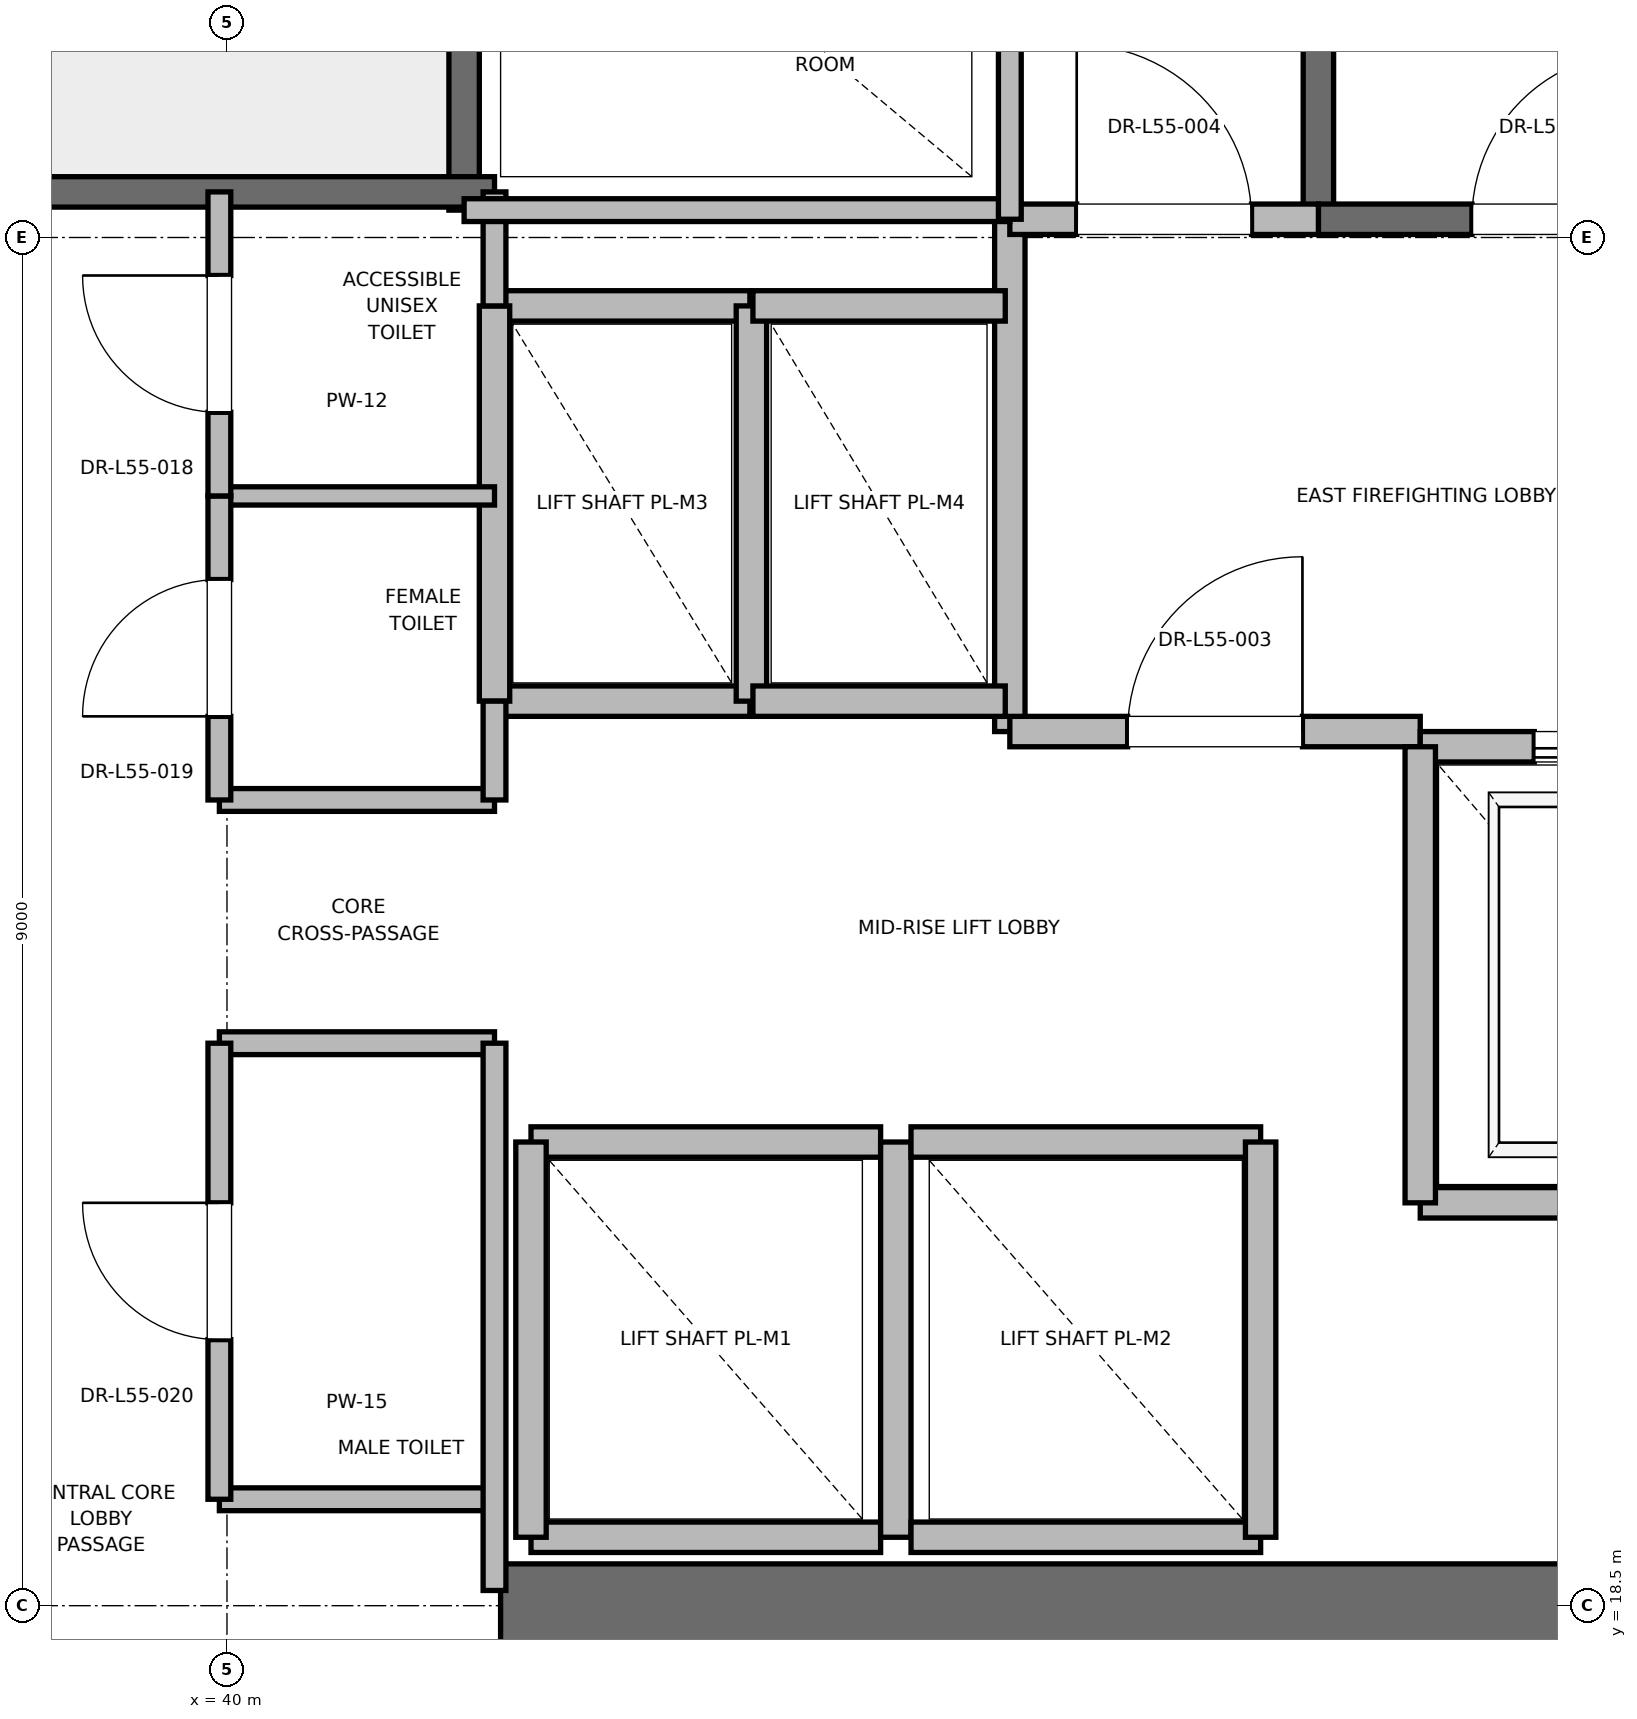
"""IFC4 building model, lengths in metres.
Left out: names, types, materials, properties, quantities, classifications, styles, units other than length and angle.
Written with IfcOpenShell. Run it as: python <this file> out.ifc"""

import sys

from ifc_helpers import new_model, si_unit, direction, frame, frame_2d, origin, place, context, subcontext, project, spatial, rectangle, extrude, element, fill, save


model = new_model("IFC4")
c1 = context("Model", 3, precision=1e-05, world=origin(), true_north=direction((0.0, 1.0)))
c2 = subcontext(c1, "Body", "Model", "MODEL_VIEW")
j1 = project(units=[si_unit("LENGTHUNIT", "METRE"), si_unit("PLANEANGLEUNIT", "RADIAN")], contexts=[c1])
p1 = place(None, origin())
s1 = spatial("IfcSite", under=j1, at=p1, CompositionType="ELEMENT")
p2 = place(p1, origin())
s2 = spatial("IfcBuilding", under=s1, at=p2, CompositionType="ELEMENT")
p3 = place(p2, frame((0.0, 0.0, 238.2)))
s3 = spatial("IfcBuildingStorey", under=s2, at=p3, CompositionType="ELEMENT", Elevation=238.2)
p4 = place(p3, frame((41.8, 18.5, 0.0), z_axis=(0.0, 0.0, 1.0), x_axis=(1.0, 0.0, 0.0)))
e1 = element("IfcWall", 1, at=p4, inside=s3, PredefinedType="SHEAR", context=c2, shape_type="SweptSolid", body=[
    extrude(rectangle(XDim=9.2, YDim=0.55, at=frame_2d((4.6, 0.0))), origin(), (0.0, 0.0, 1.0), 4.785),
])
p5 = place(p3, frame((47.18, 27.62, 0.0), z_axis=(0.0, 0.0, 1.0), x_axis=(0.0, 1.0, 0.0)))
e2 = element("IfcWall", 2, at=p5, inside=s3, PredefinedType="SOLIDWALL", context=c2, shape_type="SweptSolid", body=[
    extrude(rectangle(XDim=8.18, YDim=0.2, at=frame_2d((4.09, 0.0))), origin(), (0.0, 0.0, 1.0), 4.785),
])
p6 = place(p3, frame((47.18, 27.62, 0.0), z_axis=(0.0, 0.0, 1.0), x_axis=(1.0, 0.0, 0.0)))
e3 = element("IfcWall", 3, at=p6, inside=s3, PredefinedType="SOLIDWALL", context=c2, shape_type="SweptSolid", body=[
    extrude(rectangle(XDim=3.12, YDim=0.2, at=frame_2d((1.56, 0.0))), origin(), (0.0, 0.0, 1.0), 4.785),
])
p7 = place(p6, frame((1.01, 0.0, 0.0)))
e4 = element("IfcOpeningElement", 4, at=p7, cuts=e3, PredefinedType="OPENING", context=c2, shape_type="SweptSolid", body=[
    extrude(rectangle(XDim=1.1, YDim=2.15, at=frame_2d((0.55, 1.075))), frame((0.0, 0.1, 0.0), z_axis=(0.0, -1.0, 0.0), x_axis=(1.0, 0.0, 0.0)), (0.0, 0.0, 1.0), 0.2),
])
p8 = place(p3, frame((41.56, 27.68, 0.0), z_axis=(0.0, 0.0, 1.0), x_axis=(0.0, 1.0, 0.0)))
e5 = element("IfcWall", 5, at=p8, inside=s3, PredefinedType="SOLIDWALL", context=c2, shape_type="SweptSolid", body=[
    extrude(rectangle(XDim=8.57, YDim=0.2, at=frame_2d((4.285, 0.0))), origin(), (0.0, 0.0, 1.0), 4.785),
])
p9 = place(p3, frame((38.44, 27.8, 0.0), z_axis=(0.0, 0.0, 1.0), x_axis=(1.0, 0.0, 0.0)))
e6 = element("IfcWall", 6, at=p9, inside=s3, PredefinedType="SOLIDWALL", context=c2, shape_type="SweptSolid", body=[
    extrude(rectangle(XDim=3.32, YDim=0.2, at=frame_2d((1.66, 0.0))), origin(), (0.0, 0.0, 1.0), 4.785),
])
p10 = place(p3, frame((45.15, 24.25, 0.0), z_axis=(0.0, 0.0, 1.0), x_axis=(0.0, 1.0, 0.0)))
e7 = element("IfcWall", 7, at=p10, inside=s3, PredefinedType="PARTITIONING", context=c2, shape_type="SweptSolid", body=[
    extrude(rectangle(XDim=3.37, YDim=0.2, at=frame_2d((1.685, 0.0))), origin(), (0.0, 0.0, 1.0), 4.785),
])
p11 = place(p3, frame((45.15, 24.25, 0.0), z_axis=(0.0, 0.0, 1.0), x_axis=(1.0, 0.0, 0.0)))
e8 = element("IfcWall", 8, at=p11, inside=s3, PredefinedType="PARTITIONING", context=c2, shape_type="SweptSolid", body=[
    extrude(rectangle(XDim=2.7, YDim=0.2, at=frame_2d((1.35, 0.0))), origin(), (0.0, 0.0, 1.0), 4.785),
])
p12 = place(p11, frame((0.775, 0.0, 0.0)))
e9 = element("IfcOpeningElement", 9, at=p12, cuts=e8, PredefinedType="OPENING", context=c2, shape_type="SweptSolid", body=[
    extrude(rectangle(XDim=1.15, YDim=2.2, at=frame_2d((0.575, 1.1))), frame((0.0, 0.1, 0.0), z_axis=(0.0, -1.0, 0.0), x_axis=(1.0, 0.0, 0.0)), (0.0, 0.0, 1.0), 0.2),
])
p13 = place(p3, frame((45.15, 27.62, 0.0), z_axis=(0.0, 0.0, 1.0), x_axis=(1.0, 0.0, 0.0)))
e10 = element("IfcWall", 10, at=p13, inside=s3, PredefinedType="PARTITIONING", context=c2, shape_type="SweptSolid", body=[
    extrude(rectangle(XDim=2.03, YDim=0.2, at=frame_2d((1.015, 0.0))), origin(), (0.0, 0.0, 1.0), 4.785),
])
p14 = place(p13, frame((0.44, 0.0, 0.0)))
e11 = element("IfcOpeningElement", 11, at=p14, cuts=e10, PredefinedType="OPENING", context=c2, shape_type="SweptSolid", body=[
    extrude(rectangle(XDim=1.15, YDim=2.2, at=frame_2d((0.575, 1.1))), frame((0.0, 0.1, 0.0), z_axis=(0.0, -1.0, 0.0), x_axis=(1.0, 0.0, 0.0)), (0.0, 0.0, 1.0), 0.2),
])
p15 = place(p3, frame((47.85, 21.15, 0.0), z_axis=(0.0, 0.0, 1.0), x_axis=(1.0, 0.0, 0.0)))
e12 = element("IfcWall", 12, at=p15, inside=s3, PredefinedType="SOLIDWALL", context=c2, shape_type="SweptSolid", body=[
    extrude(rectangle(XDim=2.6, YDim=0.2, at=frame_2d((1.3, 0.0))), origin(), (0.0, 0.0, 1.0), 4.785),
])
p16 = place(p3, frame((50.45, 24.15, 0.0), z_axis=(0.0, 0.0, 1.0), x_axis=(-1.0, 0.0, 0.0)))
e13 = element("IfcWall", 13, at=p16, inside=s3, PredefinedType="SOLIDWALL", context=c2, shape_type="SweptSolid", body=[
    extrude(rectangle(XDim=2.6, YDim=0.2, at=frame_2d((1.3, 0.0))), origin(), (0.0, 0.0, 1.0), 3.765),
])
p17 = place(p16, frame((0.75, 0.0, 0.0)))
e14 = element("IfcOpeningElement", 14, at=p17, cuts=e13, PredefinedType="OPENING", context=c2, shape_type="SweptSolid", body=[
    extrude(rectangle(XDim=1.1, YDim=2.2, at=frame_2d((0.55, 1.1))), frame((0.0, 0.1, 0.0), z_axis=(0.0, -1.0, 0.0), x_axis=(1.0, 0.0, 0.0)), (0.0, 0.0, 1.0), 0.2),
])
p18 = place(p3, frame((47.85, 24.15, 0.0), z_axis=(0.0, 0.0, 1.0), x_axis=(0.0, -1.0, 0.0)))
e15 = element("IfcWall", 15, at=p18, inside=s3, PredefinedType="SOLIDWALL", context=c2, shape_type="SweptSolid", body=[
    extrude(rectangle(XDim=3.0, YDim=0.2, at=frame_2d((1.5, 0.0))), origin(), (0.0, 0.0, 1.0), 4.785),
])
p19 = place(p3, frame((42.0, 18.95, 0.0), z_axis=(0.0, 0.0, 1.0), x_axis=(1.0, 0.0, 0.0)))
e16 = element("IfcWall", 16, at=p19, inside=s3, PredefinedType="SOLIDWALL", context=c2, shape_type="SweptSolid", body=[
    extrude(rectangle(XDim=2.3, YDim=0.2, at=frame_2d((1.15, 0.0))), origin(), (0.0, 0.0, 1.0), 3.765),
])
p20 = place(p3, frame((44.3, 21.55, 0.0), z_axis=(0.0, 0.0, 1.0), x_axis=(-1.0, 0.0, 0.0)))
e17 = element("IfcWall", 17, at=p20, inside=s3, PredefinedType="SOLIDWALL", context=c2, shape_type="SweptSolid", body=[
    extrude(rectangle(XDim=2.3, YDim=0.2, at=frame_2d((1.15, 0.0))), origin(), (0.0, 0.0, 1.0), 4.785),
])
p21 = place(p3, frame((42.0, 21.55, 0.0), z_axis=(0.0, 0.0, 1.0), x_axis=(0.0, -1.0, 0.0)))
e18 = element("IfcWall", 18, at=p21, inside=s3, PredefinedType="SOLIDWALL", context=c2, shape_type="SweptSolid", body=[
    extrude(rectangle(XDim=2.6, YDim=0.2, at=frame_2d((1.3, 0.0))), origin(), (0.0, 0.0, 1.0), 3.765),
])
p22 = place(p3, frame((44.4, 18.95, 0.0), z_axis=(0.0, 0.0, 1.0), x_axis=(0.0, 1.0, 0.0)))
e19 = element("IfcWall", 19, at=p22, inside=s3, PredefinedType="SOLIDWALL", context=c2, shape_type="SweptSolid", body=[
    extrude(rectangle(XDim=2.6, YDim=0.2, at=frame_2d((1.3, 0.0))), origin(), (0.0, 0.0, 1.0), 4.785),
])
for number, where, z_axis, x_axis in (
    (20, (44.5, 18.95, 0.0), (0.0, 0.0, 1.0), (1.0, 0.0, 0.0)),
    (21, (46.8, 21.55, 0.0), (0.0, 0.0, 1.0), (-1.0, 0.0, 0.0)),
):
    element("IfcWall", number, at=place(p3, frame(where, z_axis=z_axis, x_axis=x_axis)), inside=s3, PredefinedType="SOLIDWALL", context=c2, shape_type="SweptSolid", body=[
        extrude(rectangle(XDim=2.3, YDim=0.2, at=frame_2d((1.15, 0.0))), origin(), (0.0, 0.0, 1.0), 4.785),
    ])
p23 = place(p3, frame((46.8, 18.95, 0.0), z_axis=(0.0, 0.0, 1.0), x_axis=(0.0, 1.0, 0.0)))
e22 = element("IfcWall", 22, at=p23, inside=s3, PredefinedType="SOLIDWALL", context=c2, shape_type="SweptSolid", body=[
    extrude(rectangle(XDim=2.6, YDim=0.2, at=frame_2d((1.3, 0.0))), origin(), (0.0, 0.0, 1.0), 4.785),
])
for number, where, z_axis, x_axis in (
    (23, (41.76, 24.45, 0.0), (0.0, 0.0, 1.0), (1.0, 0.0, 0.0)),
    (24, (43.44, 27.05, 0.0), (0.0, 0.0, 1.0), (-1.0, 0.0, 0.0)),
):
    element("IfcWall", number, at=place(p3, frame(where, z_axis=z_axis, x_axis=x_axis)), inside=s3, PredefinedType="SOLIDWALL", context=c2, shape_type="SweptSolid", body=[
        extrude(rectangle(XDim=1.68, YDim=0.2, at=frame_2d((0.84, 0.0))), origin(), (0.0, 0.0, 1.0), 4.785),
    ])
for number, where, z_axis, x_axis in (
    (25, (41.76, 27.05, 0.0), (0.0, 0.0, 1.0), (0.0, -1.0, 0.0)),
    (26, (43.45, 24.45, 0.0), (0.0, 0.0, 1.0), (0.0, 1.0, 0.0)),
):
    element("IfcWall", number, at=place(p3, frame(where, z_axis=z_axis, x_axis=x_axis)), inside=s3, PredefinedType="SOLIDWALL", context=c2, shape_type="SweptSolid", body=[
        extrude(rectangle(XDim=2.6, YDim=0.2, at=frame_2d((1.3, 0.0))), origin(), (0.0, 0.0, 1.0), 4.785),
    ])
for number, where, z_axis, x_axis in (
    (27, (43.46, 24.45, 0.0), (0.0, 0.0, 1.0), (1.0, 0.0, 0.0)),
    (28, (45.12, 27.05, 0.0), (0.0, 0.0, 1.0), (-1.0, 0.0, 0.0)),
):
    element("IfcWall", number, at=place(p3, frame(where, z_axis=z_axis, x_axis=x_axis)), inside=s3, PredefinedType="SOLIDWALL", context=c2, shape_type="SweptSolid", body=[
        extrude(rectangle(XDim=1.66, YDim=0.2, at=frame_2d((0.83, 0.0))), origin(), (0.0, 0.0, 1.0), 4.785),
    ])
for number, where, z_axis, x_axis in (
    (29, (39.95, 19.2, 0.0), (0.0, 0.0, 1.0), (1.0, 0.0, 0.0)),
    (30, (39.95, 22.2, 0.0), (0.0, 0.0, 1.0), (1.0, 0.0, 0.0)),
    (31, (39.95, 23.8, 0.0), (0.0, 0.0, 1.0), (1.0, 0.0, 0.0)),
):
    element("IfcWall", number, at=place(p3, frame(where, z_axis=z_axis, x_axis=x_axis)), inside=s3, PredefinedType="PARTITIONING", context=c2, shape_type="SweptSolid", body=[
        extrude(rectangle(XDim=1.81, YDim=0.15, at=frame_2d((0.905, 0.0))), origin(), (0.0, 0.0, 1.0), 2.85),
    ])
p24 = place(p3, frame((39.95, 25.8, 0.0), z_axis=(0.0, 0.0, 1.0), x_axis=(1.0, 0.0, 0.0)))
e32 = element("IfcWall", 32, at=p24, inside=s3, PredefinedType="PARTITIONING", context=c2, shape_type="SweptSolid", body=[
    extrude(rectangle(XDim=1.81, YDim=0.12, at=frame_2d((0.905, 0.0))), origin(), (0.0, 0.0, 1.0), 2.85),
])
p25 = place(p3, frame((41.76, 18.6, 0.0), z_axis=(0.0, 0.0, 1.0), x_axis=(0.0, 1.0, 0.0)))
e33 = element("IfcWall", 33, at=p25, inside=s3, PredefinedType="PARTITIONING", context=c2, shape_type="SweptSolid", body=[
    extrude(rectangle(XDim=3.6, YDim=0.15, at=frame_2d((1.8, 0.0))), origin(), (0.0, 0.0, 1.0), 2.85),
])
p26 = place(p3, frame((41.76, 23.8, 0.0), z_axis=(0.0, 0.0, 1.0), x_axis=(0.0, 1.0, 0.0)))
e34 = element("IfcWall", 34, at=p26, inside=s3, PredefinedType="PARTITIONING", context=c2, shape_type="SweptSolid", body=[
    extrude(rectangle(XDim=0.65, YDim=0.15, at=frame_2d((0.325, 0.0))), origin(), (0.0, 0.0, 1.0), 2.85),
])
p27 = place(p3, frame((41.76, 27.05, 0.0), z_axis=(0.0, 0.0, 1.0), x_axis=(0.0, 1.0, 0.0)))
e35 = element("IfcWall", 35, at=p27, inside=s3, PredefinedType="PARTITIONING", context=c2, shape_type="SweptSolid", body=[
    extrude(rectangle(XDim=0.75, YDim=0.15, at=frame_2d((0.375, 0.0))), origin(), (0.0, 0.0, 1.0), 2.85),
])
p28 = place(p3, frame((39.95, 19.2, 0.0), z_axis=(0.0, 0.0, 1.0), x_axis=(0.0, 1.0, 0.0)))
e36 = element("IfcWall", 36, at=p28, inside=s3, PredefinedType="PARTITIONING", context=c2, shape_type="SweptSolid", body=[
    extrude(rectangle(XDim=3.0, YDim=0.15, at=frame_2d((1.5, 0.0))), origin(), (0.0, 0.0, 1.0), 2.85),
])
p29 = place(p28, frame((1.05, 0.0, 0.0)))
e37 = element("IfcOpeningElement", 37, at=p29, cuts=e36, PredefinedType="OPENING", context=c2, shape_type="SweptSolid", body=[
    extrude(rectangle(XDim=0.9, YDim=2.1, at=frame_2d((0.45, 1.05))), frame((0.0, 0.075, 0.0), z_axis=(0.0, -1.0, 0.0), x_axis=(1.0, 0.0, 0.0)), (0.0, 0.0, 1.0), 0.15),
])
p30 = place(p3, frame((39.95, 23.8, 0.0), z_axis=(0.0, 0.0, 1.0), x_axis=(0.0, 1.0, 0.0)))
e38 = element("IfcWall", 38, at=p30, inside=s3, PredefinedType="PARTITIONING", context=c2, shape_type="SweptSolid", body=[
    extrude(rectangle(XDim=2.0, YDim=0.15, at=frame_2d((1.0, 0.0))), origin(), (0.0, 0.0, 1.0), 2.85),
])
p31 = place(p30, frame((0.55, 0.0, 0.0)))
e39 = element("IfcOpeningElement", 39, at=p31, cuts=e38, PredefinedType="OPENING", context=c2, shape_type="SweptSolid", body=[
    extrude(rectangle(XDim=0.9, YDim=2.1, at=frame_2d((0.45, 1.05))), frame((0.0, 0.075, 0.0), z_axis=(0.0, -1.0, 0.0), x_axis=(1.0, 0.0, 0.0)), (0.0, 0.0, 1.0), 0.15),
])
p32 = place(p3, frame((39.95, 25.8, 0.0), z_axis=(0.0, 0.0, 1.0), x_axis=(0.0, 1.0, 0.0)))
e40 = element("IfcWall", 40, at=p32, inside=s3, PredefinedType="PARTITIONING", context=c2, shape_type="SweptSolid", body=[
    extrude(rectangle(XDim=2.0, YDim=0.15, at=frame_2d((1.0, 0.0))), origin(), (0.0, 0.0, 1.0), 2.85),
])
p33 = place(p32, frame((0.55, 0.0, 0.0)))
e41 = element("IfcOpeningElement", 41, at=p33, cuts=e40, PredefinedType="OPENING", context=c2, shape_type="SweptSolid", body=[
    extrude(rectangle(XDim=0.9, YDim=2.1, at=frame_2d((0.45, 1.05))), frame((0.0, 0.075, 0.0), z_axis=(0.0, -1.0, 0.0), x_axis=(1.0, 0.0, 0.0)), (0.0, 0.0, 1.0), 0.15),
])
p34 = place(p3, frame((41.56, 27.68, 0.0), z_axis=(0.0, 0.0, 1.0), x_axis=(1.0, 0.0, 0.0)))
e42 = element("IfcWall", 42, at=p34, inside=s3, PredefinedType="PARTITIONING", context=c2, shape_type="SweptSolid", body=[
    extrude(rectangle(XDim=3.59, YDim=0.15, at=frame_2d((1.795, 0.0))), origin(), (0.0, 0.0, 1.0), 2.85),
])
p35 = place(p3, frame((45.15, 27.62, 0.0), z_axis=(0.0, 0.0, 1.0), x_axis=(0.0, 1.0, 0.0)))
e43 = element("IfcWall", 43, at=p35, inside=s3, PredefinedType="PARTITIONING", context=c2, shape_type="SweptSolid", body=[
    extrude(rectangle(XDim=3.1, YDim=0.15, at=frame_2d((1.55, 0.0))), origin(), (0.0, 0.0, 1.0), 2.85),
])
p36 = place(p7, origin())
e44 = element("IfcDoor", 44, at=p36, inside=s3, OperationType="SINGLE_SWING_RIGHT", PredefinedType="DOOR", context=c2, shape_type="SweptSolid", body=[
    extrude(rectangle(XDim=1.1, YDim=2.15, at=frame_2d((0.55, 1.075))), frame((0.0, 0.025, 0.0), z_axis=(0.0, -1.0, 0.0), x_axis=(1.0, 0.0, 0.0)), (0.0, 0.0, 1.0), 0.05),
])
fill(e4, e44)
p37 = place(p12, origin())
e45 = element("IfcDoor", 45, at=p37, inside=s3, OperationType="SINGLE_SWING_RIGHT", PredefinedType="DOOR", context=c2, shape_type="SweptSolid", body=[
    extrude(rectangle(XDim=1.15, YDim=2.2, at=frame_2d((0.575, 1.1))), frame((0.0, 0.025, 0.0), z_axis=(0.0, -1.0, 0.0), x_axis=(1.0, 0.0, 0.0)), (0.0, 0.0, 1.0), 0.05),
])
fill(e9, e45)
p38 = place(p14, origin())
e46 = element("IfcDoor", 46, at=p38, inside=s3, OperationType="SINGLE_SWING_LEFT", PredefinedType="DOOR", context=c2, shape_type="SweptSolid", body=[
    extrude(rectangle(XDim=1.15, YDim=2.2, at=frame_2d((0.575, 1.1))), frame((0.0, 0.025, 0.0), z_axis=(0.0, -1.0, 0.0), x_axis=(1.0, 0.0, 0.0)), (0.0, 0.0, 1.0), 0.05),
])
fill(e11, e46)
p39 = place(p17, origin())
e47 = element("IfcDoor", 47, at=p39, inside=s3, OperationType="SLIDING_TO_RIGHT", PredefinedType="DOOR", context=c2, shape_type="SweptSolid", body=[
    extrude(rectangle(XDim=1.1, YDim=2.2, at=frame_2d((0.55, 1.1))), frame((0.0, 0.025, 0.0), z_axis=(0.0, -1.0, 0.0), x_axis=(1.0, 0.0, 0.0)), (0.0, 0.0, 1.0), 0.05),
])
fill(e14, e47)
p40 = place(p29, origin())
e48 = element("IfcDoor", 48, at=p40, inside=s3, OperationType="SINGLE_SWING_RIGHT", PredefinedType="DOOR", context=c2, shape_type="SweptSolid", body=[
    extrude(rectangle(XDim=0.9, YDim=2.1, at=frame_2d((0.45, 1.05))), frame((0.0, 0.025, 0.0), z_axis=(0.0, -1.0, 0.0), x_axis=(1.0, 0.0, 0.0)), (0.0, 0.0, 1.0), 0.05),
])
fill(e37, e48)
p41 = place(p31, origin())
e49 = element("IfcDoor", 49, at=p41, inside=s3, OperationType="SINGLE_SWING_LEFT", PredefinedType="DOOR", context=c2, shape_type="SweptSolid", body=[
    extrude(rectangle(XDim=0.9, YDim=2.1, at=frame_2d((0.45, 1.05))), frame((0.0, 0.025, 0.0), z_axis=(0.0, -1.0, 0.0), x_axis=(1.0, 0.0, 0.0)), (0.0, 0.0, 1.0), 0.05),
])
fill(e39, e49)
p42 = place(p33, origin())
e50 = element("IfcDoor", 50, at=p42, inside=s3, OperationType="SINGLE_SWING_RIGHT", PredefinedType="DOOR", context=c2, shape_type="SweptSolid", body=[
    extrude(rectangle(XDim=0.9, YDim=2.1, at=frame_2d((0.45, 1.05))), frame((0.0, 0.025, 0.0), z_axis=(0.0, -1.0, 0.0), x_axis=(1.0, 0.0, 0.0)), (0.0, 0.0, 1.0), 0.05),
])
fill(e41, e50)
save(model, sys.argv[1])
